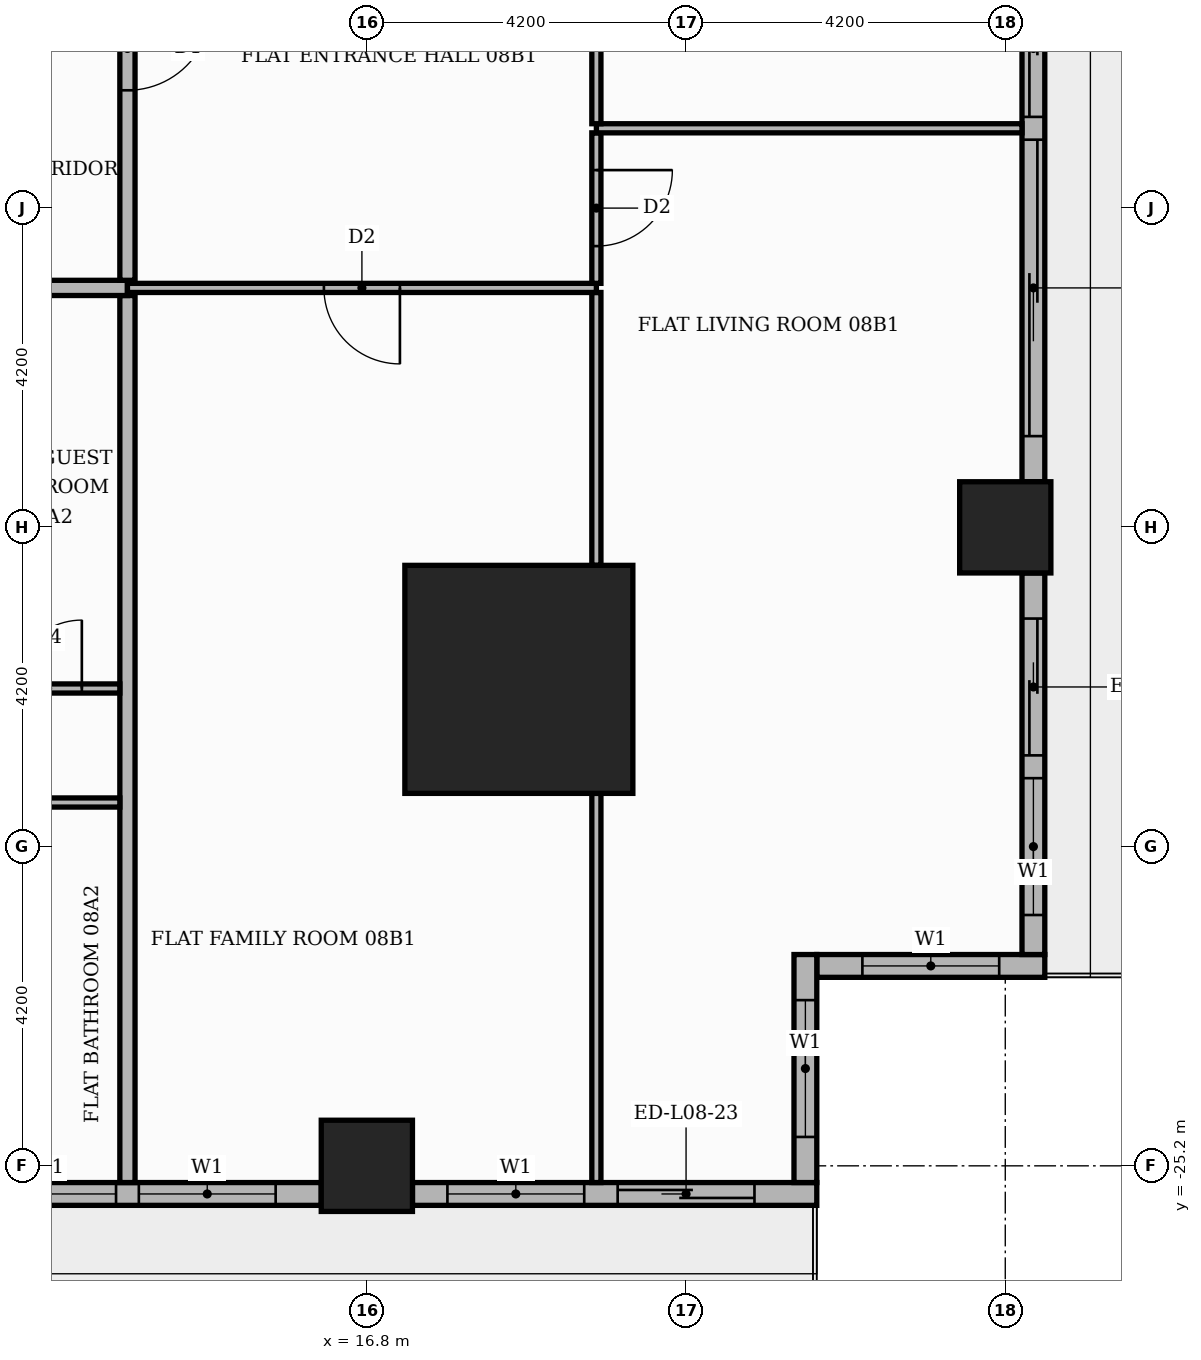
"""IFC4 building model, lengths in metres.
Left out: names, types, materials, properties, quantities, classifications, styles, units other than length and angle.
Written with IfcOpenShell. Run it as: python <this file> out.ifc"""

import sys

from ifc_helpers import new_model, si_unit, direction, frame, frame_2d, origin, origin_2d, place, context, subcontext, project, spatial, rectangle, extrude, element, fill, save


model = new_model("IFC4")
c1 = context("Model", 3, precision=1e-05, world=origin(), true_north=direction((0.0, 1.0)))
c2 = subcontext(c1, "Body", "Model", "MODEL_VIEW")
j1 = project(units=[si_unit("LENGTHUNIT", "METRE"), si_unit("PLANEANGLEUNIT", "RADIAN")], contexts=[c1])
p1 = place(None, origin())
s1 = spatial("IfcSite", under=j1, at=p1, CompositionType="ELEMENT")
p2 = place(p1, origin())
s2 = spatial("IfcBuilding", under=s1, at=p2, CompositionType="ELEMENT")
p3 = place(p2, frame((0.0, 0.0, 38.7)))
s3 = spatial("IfcBuildingStorey", under=s2, at=p3, CompositionType="ELEMENT", Elevation=38.7)
p4 = place(p3, frame((18.8, -18.8, 0.0), z_axis=(0.0, 0.0, 1.0), x_axis=(1.0, 0.0, 0.0)))
e1 = element("IfcColumn", 1, at=p4, inside=s3, PredefinedType="COLUMN", context=c2, shape_type="SweptSolid", body=[
    extrude(rectangle(XDim=3.0, YDim=3.0, at=origin_2d()), origin(), (0.0, 0.0, 1.0), 3.9),
])
for number, where, z_axis, x_axis in (
    (2, (25.2, -16.8, 0.0), (0.0, 0.0, 1.0), (1.0, 0.0, 0.0)),
    (3, (16.8, -25.2, 0.0), (0.0, 0.0, 1.0), (1.0, 0.0, 0.0)),
):
    element("IfcColumn", number, at=place(p3, frame(where, z_axis=z_axis, x_axis=x_axis)), inside=s3, PredefinedType="COLUMN", context=c2, shape_type="SweptSolid", body=[
        extrude(rectangle(XDim=1.2, YDim=1.2, at=origin_2d()), origin(), (0.0, 0.0, 1.0), 3.9),
    ])
p5 = place(p3, frame((22.72, -22.57, 0.0), z_axis=(0.0, 0.0, 1.0), x_axis=(1.0, 0.0, 0.0)))
e4 = element("IfcWall", 4, at=p5, inside=s3, PredefinedType="STANDARD", context=c2, shape_type="SweptSolid", body=[
    extrude(rectangle(XDim=3.0, YDim=0.3, at=frame_2d((1.5, 0.0))), origin(), (0.0, 0.0, 1.0), 3.48),
])
p6 = place(p5, frame((0.6, 0.0, 0.9)))
e5 = element("IfcOpeningElement", 5, at=p6, cuts=e4, PredefinedType="OPENING", context=c2, shape_type="SweptSolid", body=[
    extrude(rectangle(XDim=1.8, YDim=2.1, at=frame_2d((0.9, 1.05))), frame((0.0, 0.16, 0.0), z_axis=(0.0, -1.0, 0.0), x_axis=(1.0, 0.0, 0.0)), (0.0, 0.0, 1.0), 0.32),
])
p7 = place(p3, frame((25.57, -22.42, 0.0), z_axis=(0.0, 0.0, 1.0), x_axis=(0.0, 1.0, 0.0)))
e6 = element("IfcWall", 6, at=p7, inside=s3, PredefinedType="STANDARD", context=c2, shape_type="SweptSolid", body=[
    extrude(rectangle(XDim=5.02, YDim=0.3, at=frame_2d((2.51, 0.0))), origin(), (0.0, 0.0, 1.0), 3.48),
])
p8 = place(p7, frame((0.52, 0.0, 0.9)))
e7 = element("IfcOpeningElement", 7, at=p8, cuts=e6, PredefinedType="OPENING", context=c2, shape_type="SweptSolid", body=[
    extrude(rectangle(XDim=1.8, YDim=2.1, at=frame_2d((0.9, 1.05))), frame((0.0, 0.16, 0.0), z_axis=(0.0, -1.0, 0.0), x_axis=(1.0, 0.0, 0.0)), (0.0, 0.0, 1.0), 0.32),
])
p9 = place(p7, frame((2.62, 0.0, 0.0)))
e8 = element("IfcOpeningElement", 8, at=p9, cuts=e6, PredefinedType="OPENING", context=c2, shape_type="SweptSolid", body=[
    extrude(rectangle(XDim=1.8, YDim=2.4, at=frame_2d((0.9, 1.2))), frame((0.0, 0.16, 0.0), z_axis=(0.0, -1.0, 0.0), x_axis=(1.0, 0.0, 0.0)), (0.0, 0.0, 1.0), 0.32),
])
p10 = place(p3, frame((25.57, -16.2, 0.0), z_axis=(0.0, 0.0, 1.0), x_axis=(0.0, 1.0, 0.0)))
e9 = element("IfcWall", 9, at=p10, inside=s3, PredefinedType="STANDARD", context=c2, shape_type="SweptSolid", body=[
    extrude(rectangle(XDim=7.2, YDim=0.3, at=frame_2d((3.6, 0.0))), origin(), (0.0, 0.0, 1.0), 3.48),
])
p11 = place(p10, frame((0.6, 0.0, 0.0)))
e10 = element("IfcOpeningElement", 10, at=p11, cuts=e9, PredefinedType="OPENING", context=c2, shape_type="SweptSolid", body=[
    extrude(rectangle(XDim=3.9, YDim=2.4, at=frame_2d((1.95, 1.2))), frame((0.0, 0.16, 0.0), z_axis=(0.0, -1.0, 0.0), x_axis=(1.0, 0.0, 0.0)), (0.0, 0.0, 1.0), 0.32),
])
p12 = place(p10, frame((4.8, 0.0, 0.0)))
e11 = element("IfcOpeningElement", 11, at=p12, cuts=e9, PredefinedType="OPENING", context=c2, shape_type="SweptSolid", body=[
    extrude(rectangle(XDim=1.8, YDim=2.4, at=frame_2d((0.9, 1.2))), frame((0.0, 0.16, 0.0), z_axis=(0.0, -1.0, 0.0), x_axis=(1.0, 0.0, 0.0)), (0.0, 0.0, 1.0), 0.32),
])
p13 = place(p3, frame((9.0, -25.57, 0.0), z_axis=(0.0, 0.0, 1.0), x_axis=(1.0, 0.0, 0.0)))
e12 = element("IfcWall", 12, at=p13, inside=s3, PredefinedType="STANDARD", context=c2, shape_type="SweptSolid", body=[
    extrude(rectangle(XDim=7.2, YDim=0.3, at=frame_2d((3.6, 0.0))), origin(), (0.0, 0.0, 1.0), 3.48),
])
p14 = place(p13, frame((0.6, 0.0, 0.9)))
e13 = element("IfcOpeningElement", 13, at=p14, cuts=e12, PredefinedType="OPENING", context=c2, shape_type="SweptSolid", body=[
    extrude(rectangle(XDim=1.8, YDim=2.1, at=frame_2d((0.9, 1.05))), frame((0.0, 0.16, 0.0), z_axis=(0.0, -1.0, 0.0), x_axis=(1.0, 0.0, 0.0)), (0.0, 0.0, 1.0), 0.32),
])
p15 = place(p13, frame((2.7, 0.0, 0.9)))
e14 = element("IfcOpeningElement", 14, at=p15, cuts=e12, PredefinedType="OPENING", context=c2, shape_type="SweptSolid", body=[
    extrude(rectangle(XDim=1.8, YDim=2.1, at=frame_2d((0.9, 1.05))), frame((0.0, 0.16, 0.0), z_axis=(0.0, -1.0, 0.0), x_axis=(1.0, 0.0, 0.0)), (0.0, 0.0, 1.0), 0.32),
])
p16 = place(p13, frame((4.8, 0.0, 0.9)))
e15 = element("IfcOpeningElement", 15, at=p16, cuts=e12, PredefinedType="OPENING", context=c2, shape_type="SweptSolid", body=[
    extrude(rectangle(XDim=1.8, YDim=2.1, at=frame_2d((0.9, 1.05))), frame((0.0, 0.16, 0.0), z_axis=(0.0, -1.0, 0.0), x_axis=(1.0, 0.0, 0.0)), (0.0, 0.0, 1.0), 0.32),
])
p17 = place(p3, frame((17.4, -25.57, 0.0), z_axis=(0.0, 0.0, 1.0), x_axis=(1.0, 0.0, 0.0)))
e16 = element("IfcWall", 16, at=p17, inside=s3, PredefinedType="STANDARD", context=c2, shape_type="SweptSolid", body=[
    extrude(rectangle(XDim=5.32, YDim=0.3, at=frame_2d((2.66, 0.0))), origin(), (0.0, 0.0, 1.0), 3.48),
])
p18 = place(p17, frame((2.7, 0.0, 0.0)))
e17 = element("IfcOpeningElement", 17, at=p18, cuts=e16, PredefinedType="OPENING", context=c2, shape_type="SweptSolid", body=[
    extrude(rectangle(XDim=1.8, YDim=2.4, at=frame_2d((0.9, 1.2))), frame((0.0, 0.16, 0.0), z_axis=(0.0, -1.0, 0.0), x_axis=(1.0, 0.0, 0.0)), (0.0, 0.0, 1.0), 0.32),
])
p19 = place(p17, frame((0.46, 0.0, 0.9)))
e18 = element("IfcOpeningElement", 18, at=p19, cuts=e16, PredefinedType="OPENING", context=c2, shape_type="SweptSolid", body=[
    extrude(rectangle(XDim=1.8, YDim=2.1, at=frame_2d((0.9, 1.05))), frame((0.0, 0.16, 0.0), z_axis=(0.0, -1.0, 0.0), x_axis=(1.0, 0.0, 0.0)), (0.0, 0.0, 1.0), 0.32),
])
p20 = place(p3, frame((22.57, -25.42, 0.0), z_axis=(0.0, 0.0, 1.0), x_axis=(0.0, 1.0, 0.0)))
e19 = element("IfcWall", 19, at=p20, inside=s3, PredefinedType="STANDARD", context=c2, shape_type="SweptSolid", body=[
    extrude(rectangle(XDim=3.0, YDim=0.3, at=frame_2d((1.5, 0.0))), origin(), (0.0, 0.0, 1.0), 3.48),
])
p21 = place(p20, frame((0.6, 0.0, 0.9)))
e20 = element("IfcOpeningElement", 20, at=p21, cuts=e19, PredefinedType="OPENING", context=c2, shape_type="SweptSolid", body=[
    extrude(rectangle(XDim=1.8, YDim=2.1, at=frame_2d((0.9, 1.05))), frame((0.0, 0.16, 0.0), z_axis=(0.0, -1.0, 0.0), x_axis=(1.0, 0.0, 0.0)), (0.0, 0.0, 1.0), 0.32),
])
p22 = place(p3, frame((13.65, -25.42, 0.0), z_axis=(0.0, 0.0, 1.0), x_axis=(0.0, 1.0, 0.0)))
e21 = element("IfcWall", 21, at=p22, inside=s3, PredefinedType="PARTITIONING", context=c2, shape_type="SweptSolid", body=[
    extrude(rectangle(XDim=11.67, YDim=0.2, at=frame_2d((5.835, 0.0))), origin(), (0.0, 0.0, 1.0), 3.48),
])
p23 = place(p3, frame((19.82, -25.42, 0.0), z_axis=(0.0, 0.0, 1.0), x_axis=(0.0, 1.0, 0.0)))
e22 = element("IfcWall", 22, at=p23, inside=s3, PredefinedType="PARTITIONING", context=c2, shape_type="SweptSolid", body=[
    extrude(rectangle(XDim=5.12, YDim=0.12, at=frame_2d((2.56, 0.0))), origin(), (0.0, 0.0, 1.0), 3.48),
])
p24 = place(p3, frame((5.25, -20.42, 0.0), z_axis=(0.0, 0.0, 1.0), x_axis=(1.0, 0.0, 0.0)))
e23 = element("IfcWall", 23, at=p24, inside=s3, PredefinedType="PARTITIONING", context=c2, shape_type="SweptSolid", body=[
    extrude(rectangle(XDim=8.3, YDim=0.12, at=frame_2d((4.15, 0.0))), origin(), (0.0, 0.0, 1.0), 3.48),
])
p25 = place(p24, frame((1.65, 0.0, 0.0)))
e24 = element("IfcOpeningElement", 24, at=p25, cuts=e23, PredefinedType="OPENING", context=c2, shape_type="SweptSolid", body=[
    extrude(rectangle(XDim=0.9, YDim=2.1, at=frame_2d((0.45, 1.05))), frame((0.0, 0.07, 0.0), z_axis=(0.0, -1.0, 0.0), x_axis=(1.0, 0.0, 0.0)), (0.0, 0.0, 1.0), 0.14),
])
p26 = place(p3, frame((-1.05, -18.92, 0.0), z_axis=(0.0, 0.0, 1.0), x_axis=(1.0, 0.0, 0.0)))
e25 = element("IfcWall", 25, at=p26, inside=s3, PredefinedType="PARTITIONING", context=c2, shape_type="SweptSolid", body=[
    extrude(rectangle(XDim=14.6, YDim=0.12, at=frame_2d((7.3, 0.0))), origin(), (0.0, 0.0, 1.0), 3.48),
])
p27 = place(p26, frame((2.7, 0.0, 0.0)))
e26 = element("IfcOpeningElement", 26, at=p27, cuts=e25, PredefinedType="OPENING", context=c2, shape_type="SweptSolid", body=[
    extrude(rectangle(XDim=0.9, YDim=2.1, at=frame_2d((0.45, 1.05))), frame((0.0, 0.07, 0.0), z_axis=(0.0, -1.0, 0.0), x_axis=(1.0, 0.0, 0.0)), (0.0, 0.0, 1.0), 0.14),
])
p28 = place(p26, frame((7.75, 0.0, 0.0)))
e27 = element("IfcOpeningElement", 27, at=p28, cuts=e25, PredefinedType="OPENING", context=c2, shape_type="SweptSolid", body=[
    extrude(rectangle(XDim=1.0, YDim=2.1, at=frame_2d((0.5, 1.05))), frame((0.0, 0.07, 0.0), z_axis=(0.0, -1.0, 0.0), x_axis=(1.0, 0.0, 0.0)), (0.0, 0.0, 1.0), 0.14),
])
p29 = place(p26, frame((10.95, 0.0, 0.0)))
e28 = element("IfcOpeningElement", 28, at=p29, cuts=e25, PredefinedType="OPENING", context=c2, shape_type="SweptSolid", body=[
    extrude(rectangle(XDim=0.9, YDim=2.1, at=frame_2d((0.45, 1.05))), frame((0.0, 0.07, 0.0), z_axis=(0.0, -1.0, 0.0), x_axis=(1.0, 0.0, 0.0)), (0.0, 0.0, 1.0), 0.14),
])
p30 = place(p26, frame((13.2, 0.0, 0.0)))
e29 = element("IfcOpeningElement", 29, at=p30, cuts=e25, PredefinedType="OPENING", context=c2, shape_type="SweptSolid", body=[
    extrude(rectangle(XDim=0.9, YDim=2.1, at=frame_2d((0.45, 1.05))), frame((0.0, 0.07, 0.0), z_axis=(0.0, -1.0, 0.0), x_axis=(1.0, 0.0, 0.0)), (0.0, 0.0, 1.0), 0.14),
])
p31 = place(p3, frame((19.82, -17.3, 0.0), z_axis=(0.0, 0.0, 1.0), x_axis=(0.0, 1.0, 0.0)))
e30 = element("IfcWall", 30, at=p31, inside=s3, PredefinedType="PARTITIONING", context=c2, shape_type="SweptSolid", body=[
    extrude(rectangle(XDim=3.59, YDim=0.12, at=frame_2d((1.795, 0.0))), origin(), (0.0, 0.0, 1.0), 3.48),
])
p32 = place(p3, frame((-25.42, -13.65, 0.0), z_axis=(0.0, 0.0, 1.0), x_axis=(1.0, 0.0, 0.0)))
e31 = element("IfcWall", 31, at=p32, inside=s3, PredefinedType="PARTITIONING", context=c2, shape_type="SweptSolid", body=[
    extrude(rectangle(XDim=39.07, YDim=0.2, at=frame_2d((19.535, 0.0))), origin(), (0.0, 0.0, 1.0), 3.48),
])
p33 = place(p32, frame((13.32, 0.0, 0.0)))
e32 = element("IfcOpeningElement", 32, at=p33, cuts=e31, PredefinedType="OPENING", context=c2, shape_type="SweptSolid", body=[
    extrude(rectangle(XDim=1.1, YDim=2.4, at=frame_2d((0.55, 1.2))), frame((0.0, 0.11, 0.0), z_axis=(0.0, -1.0, 0.0), x_axis=(1.0, 0.0, 0.0)), (0.0, 0.0, 1.0), 0.22),
])
p34 = place(p32, frame((21.72, 0.0, 0.0)))
e33 = element("IfcOpeningElement", 33, at=p34, cuts=e31, PredefinedType="OPENING", context=c2, shape_type="SweptSolid", body=[
    extrude(rectangle(XDim=1.1, YDim=2.4, at=frame_2d((0.55, 1.2))), frame((0.0, 0.11, 0.0), z_axis=(0.0, -1.0, 0.0), x_axis=(1.0, 0.0, 0.0)), (0.0, 0.0, 1.0), 0.22),
])
p35 = place(p3, frame((13.65, -13.65, 0.0), z_axis=(0.0, 0.0, 1.0), x_axis=(1.0, 0.0, 0.0)))
e34 = element("IfcWall", 34, at=p35, inside=s3, PredefinedType="PARTITIONING", context=c2, shape_type="SweptSolid", body=[
    extrude(rectangle(XDim=6.17, YDim=0.12, at=frame_2d((3.085, 0.0))), origin(), (0.0, 0.0, 1.0), 3.48),
])
p36 = place(p35, frame((2.585, 0.0, 0.0)))
e35 = element("IfcOpeningElement", 35, at=p36, cuts=e34, PredefinedType="OPENING", context=c2, shape_type="SweptSolid", body=[
    extrude(rectangle(XDim=1.0, YDim=2.1, at=frame_2d((0.5, 1.05))), frame((0.0, 0.07, 0.0), z_axis=(0.0, -1.0, 0.0), x_axis=(1.0, 0.0, 0.0)), (0.0, 0.0, 1.0), 0.14),
])
p37 = place(p3, frame((19.82, -13.59, 0.0), z_axis=(0.0, 0.0, 1.0), x_axis=(0.0, 1.0, 0.0)))
e36 = element("IfcWall", 36, at=p37, inside=s3, PredefinedType="PARTITIONING", context=c2, shape_type="SweptSolid", body=[
    extrude(rectangle(XDim=1.98, YDim=0.12, at=frame_2d((0.99, 0.0))), origin(), (0.0, 0.0, 1.0), 3.48),
])
p38 = place(p37, frame((0.49, 0.0, 0.0)))
e37 = element("IfcOpeningElement", 37, at=p38, cuts=e36, PredefinedType="OPENING", context=c2, shape_type="SweptSolid", body=[
    extrude(rectangle(XDim=1.0, YDim=2.1, at=frame_2d((0.5, 1.05))), frame((0.0, 0.07, 0.0), z_axis=(0.0, -1.0, 0.0), x_axis=(1.0, 0.0, 0.0)), (0.0, 0.0, 1.0), 0.14),
])
p39 = place(p3, frame((13.65, -13.55, 0.0), z_axis=(0.0, 0.0, 1.0), x_axis=(0.0, 1.0, 0.0)))
e38 = element("IfcWall", 38, at=p39, inside=s3, PredefinedType="PARTITIONING", context=c2, shape_type="SweptSolid", body=[
    extrude(rectangle(XDim=27.1, YDim=0.2, at=frame_2d((13.55, 0.0))), origin(), (0.0, 0.0, 1.0), 3.48),
])
p40 = place(p39, frame((2.5, 0.0, 0.0)))
e39 = element("IfcOpeningElement", 39, at=p40, cuts=e38, PredefinedType="OPENING", context=c2, shape_type="SweptSolid", body=[
    extrude(rectangle(XDim=1.1, YDim=2.4, at=frame_2d((0.55, 1.2))), frame((0.0, 0.11, 0.0), z_axis=(0.0, -1.0, 0.0), x_axis=(1.0, 0.0, 0.0)), (0.0, 0.0, 1.0), 0.22),
])
p41 = place(p3, frame((19.82, -11.55, 0.0), z_axis=(0.0, 0.0, 1.0), x_axis=(1.0, 0.0, 0.0)))
e40 = element("IfcWall", 40, at=p41, inside=s3, PredefinedType="PARTITIONING", context=c2, shape_type="SweptSolid", body=[
    extrude(rectangle(XDim=5.6, YDim=0.12, at=frame_2d((2.8, 0.0))), origin(), (0.0, 0.0, 1.0), 3.48),
])
p42 = place(p3, frame((19.82, -11.49, 0.0), z_axis=(0.0, 0.0, 1.0), x_axis=(0.0, 1.0, 0.0)))
e41 = element("IfcWall", 41, at=p42, inside=s3, PredefinedType="PARTITIONING", context=c2, shape_type="SweptSolid", body=[
    extrude(rectangle(XDim=6.18, YDim=0.12, at=frame_2d((3.09, 0.0))), origin(), (0.0, 0.0, 1.0), 3.48),
])
p43 = place(p42, frame((2.64, 0.0, 0.0)))
e42 = element("IfcOpeningElement", 42, at=p43, cuts=e41, PredefinedType="OPENING", context=c2, shape_type="SweptSolid", body=[
    extrude(rectangle(XDim=0.9, YDim=2.1, at=frame_2d((0.45, 1.05))), frame((0.0, 0.07, 0.0), z_axis=(0.0, -1.0, 0.0), x_axis=(1.0, 0.0, 0.0)), (0.0, 0.0, 1.0), 0.14),
])
p44 = place(p6, origin())
e43 = element("IfcWindow", 43, at=p44, inside=s3, PartitioningType="SINGLE_PANEL", PredefinedType="WINDOW", context=c2, shape_type="SweptSolid", body=[
    extrude(rectangle(XDim=1.8, YDim=2.1, at=frame_2d((0.9, 1.05))), frame((0.0, 0.03, 0.0), z_axis=(0.0, -1.0, 0.0), x_axis=(1.0, 0.0, 0.0)), (0.0, 0.0, 1.0), 0.06),
])
fill(e5, e43)
p45 = place(p8, origin())
e44 = element("IfcWindow", 44, at=p45, inside=s3, PartitioningType="SINGLE_PANEL", PredefinedType="WINDOW", context=c2, shape_type="SweptSolid", body=[
    extrude(rectangle(XDim=1.8, YDim=2.1, at=frame_2d((0.9, 1.05))), frame((0.0, 0.03, 0.0), z_axis=(0.0, -1.0, 0.0), x_axis=(1.0, 0.0, 0.0)), (0.0, 0.0, 1.0), 0.06),
])
fill(e7, e44)
p46 = place(p9, origin())
e45 = element("IfcDoor", 45, at=p46, inside=s3, OperationType="SLIDING_TO_RIGHT", PredefinedType="DOOR", context=c2, shape_type="SweptSolid", body=[
    extrude(rectangle(XDim=1.8, YDim=2.4, at=frame_2d((0.9, 1.2))), frame((0.0, 0.025, 0.0), z_axis=(0.0, -1.0, 0.0), x_axis=(1.0, 0.0, 0.0)), (0.0, 0.0, 1.0), 0.05),
])
fill(e8, e45)
p47 = place(p11, origin())
e46 = element("IfcDoor", 46, at=p47, inside=s3, OperationType="SLIDING_TO_LEFT", PredefinedType="DOOR", context=c2, shape_type="SweptSolid", body=[
    extrude(rectangle(XDim=3.9, YDim=2.4, at=frame_2d((1.95, 1.2))), frame((0.0, 0.025, 0.0), z_axis=(0.0, -1.0, 0.0), x_axis=(1.0, 0.0, 0.0)), (0.0, 0.0, 1.0), 0.05),
])
fill(e10, e46)
p48 = place(p12, origin())
e47 = element("IfcDoor", 47, at=p48, inside=s3, OperationType="SLIDING_TO_RIGHT", PredefinedType="DOOR", context=c2, shape_type="SweptSolid", body=[
    extrude(rectangle(XDim=1.8, YDim=2.4, at=frame_2d((0.9, 1.2))), frame((0.0, 0.025, 0.0), z_axis=(0.0, -1.0, 0.0), x_axis=(1.0, 0.0, 0.0)), (0.0, 0.0, 1.0), 0.05),
])
fill(e11, e47)
p49 = place(p15, origin())
e48 = element("IfcWindow", 48, at=p49, inside=s3, PartitioningType="SINGLE_PANEL", PredefinedType="WINDOW", context=c2, shape_type="SweptSolid", body=[
    extrude(rectangle(XDim=1.8, YDim=2.1, at=frame_2d((0.9, 1.05))), frame((0.0, 0.03, 0.0), z_axis=(0.0, -1.0, 0.0), x_axis=(1.0, 0.0, 0.0)), (0.0, 0.0, 1.0), 0.06),
])
fill(e14, e48)
p50 = place(p16, origin())
e49 = element("IfcWindow", 49, at=p50, inside=s3, PartitioningType="SINGLE_PANEL", PredefinedType="WINDOW", context=c2, shape_type="SweptSolid", body=[
    extrude(rectangle(XDim=1.8, YDim=2.1, at=frame_2d((0.9, 1.05))), frame((0.0, 0.03, 0.0), z_axis=(0.0, -1.0, 0.0), x_axis=(1.0, 0.0, 0.0)), (0.0, 0.0, 1.0), 0.06),
])
fill(e15, e49)
p51 = place(p18, origin())
e50 = element("IfcDoor", 50, at=p51, inside=s3, OperationType="SLIDING_TO_LEFT", PredefinedType="DOOR", context=c2, shape_type="SweptSolid", body=[
    extrude(rectangle(XDim=1.8, YDim=2.4, at=frame_2d((0.9, 1.2))), frame((0.0, 0.025, 0.0), z_axis=(0.0, -1.0, 0.0), x_axis=(1.0, 0.0, 0.0)), (0.0, 0.0, 1.0), 0.05),
])
fill(e17, e50)
p52 = place(p19, origin())
e51 = element("IfcWindow", 51, at=p52, inside=s3, PartitioningType="SINGLE_PANEL", PredefinedType="WINDOW", context=c2, shape_type="SweptSolid", body=[
    extrude(rectangle(XDim=1.8, YDim=2.1, at=frame_2d((0.9, 1.05))), frame((0.0, 0.03, 0.0), z_axis=(0.0, -1.0, 0.0), x_axis=(1.0, 0.0, 0.0)), (0.0, 0.0, 1.0), 0.06),
])
fill(e18, e51)
p53 = place(p21, origin())
e52 = element("IfcWindow", 52, at=p53, inside=s3, PartitioningType="SINGLE_PANEL", PredefinedType="WINDOW", context=c2, shape_type="SweptSolid", body=[
    extrude(rectangle(XDim=1.8, YDim=2.1, at=frame_2d((0.9, 1.05))), frame((0.0, 0.03, 0.0), z_axis=(0.0, -1.0, 0.0), x_axis=(1.0, 0.0, 0.0)), (0.0, 0.0, 1.0), 0.06),
])
fill(e20, e52)
p54 = place(p30, origin())
e53 = element("IfcDoor", 53, at=p54, inside=s3, OperationType="SINGLE_SWING_RIGHT", PredefinedType="DOOR", context=c2, shape_type="SweptSolid", body=[
    extrude(rectangle(XDim=0.9, YDim=2.1, at=frame_2d((0.45, 1.05))), frame((0.0, 0.025, 0.0), z_axis=(0.0, -1.0, 0.0), x_axis=(1.0, 0.0, 0.0)), (0.0, 0.0, 1.0), 0.05),
])
fill(e29, e53)
p55 = place(p40, frame((1.1, 0.0, 0.0), z_axis=(0.0, 0.0, 1.0), x_axis=(-1.0, 0.0, 0.0)))
e54 = element("IfcDoor", 54, at=p55, inside=s3, OperationType="SINGLE_SWING_RIGHT", PredefinedType="DOOR", context=c2, shape_type="SweptSolid", body=[
    extrude(rectangle(XDim=1.1, YDim=2.4, at=frame_2d((0.55, 1.2))), frame((0.0, 0.025, 0.0), z_axis=(0.0, -1.0, 0.0), x_axis=(1.0, 0.0, 0.0)), (0.0, 0.0, 1.0), 0.05),
])
fill(e39, e54)
p56 = place(p36, frame((1.0, 0.0, 0.0), z_axis=(0.0, 0.0, 1.0), x_axis=(-1.0, 0.0, 0.0)))
e55 = element("IfcDoor", 55, at=p56, inside=s3, OperationType="SINGLE_SWING_RIGHT", PredefinedType="DOOR", context=c2, shape_type="SweptSolid", body=[
    extrude(rectangle(XDim=1.0, YDim=2.1, at=frame_2d((0.5, 1.05))), frame((0.0, 0.025, 0.0), z_axis=(0.0, -1.0, 0.0), x_axis=(1.0, 0.0, 0.0)), (0.0, 0.0, 1.0), 0.05),
])
fill(e35, e55)
p57 = place(p38, frame((1.0, 0.0, 0.0), z_axis=(0.0, 0.0, 1.0), x_axis=(-1.0, 0.0, 0.0)))
e56 = element("IfcDoor", 56, at=p57, inside=s3, OperationType="SINGLE_SWING_RIGHT", PredefinedType="DOOR", context=c2, shape_type="SweptSolid", body=[
    extrude(rectangle(XDim=1.0, YDim=2.1, at=frame_2d((0.5, 1.05))), frame((0.0, 0.025, 0.0), z_axis=(0.0, -1.0, 0.0), x_axis=(1.0, 0.0, 0.0)), (0.0, 0.0, 1.0), 0.05),
])
fill(e37, e56)
save(model, sys.argv[1])
